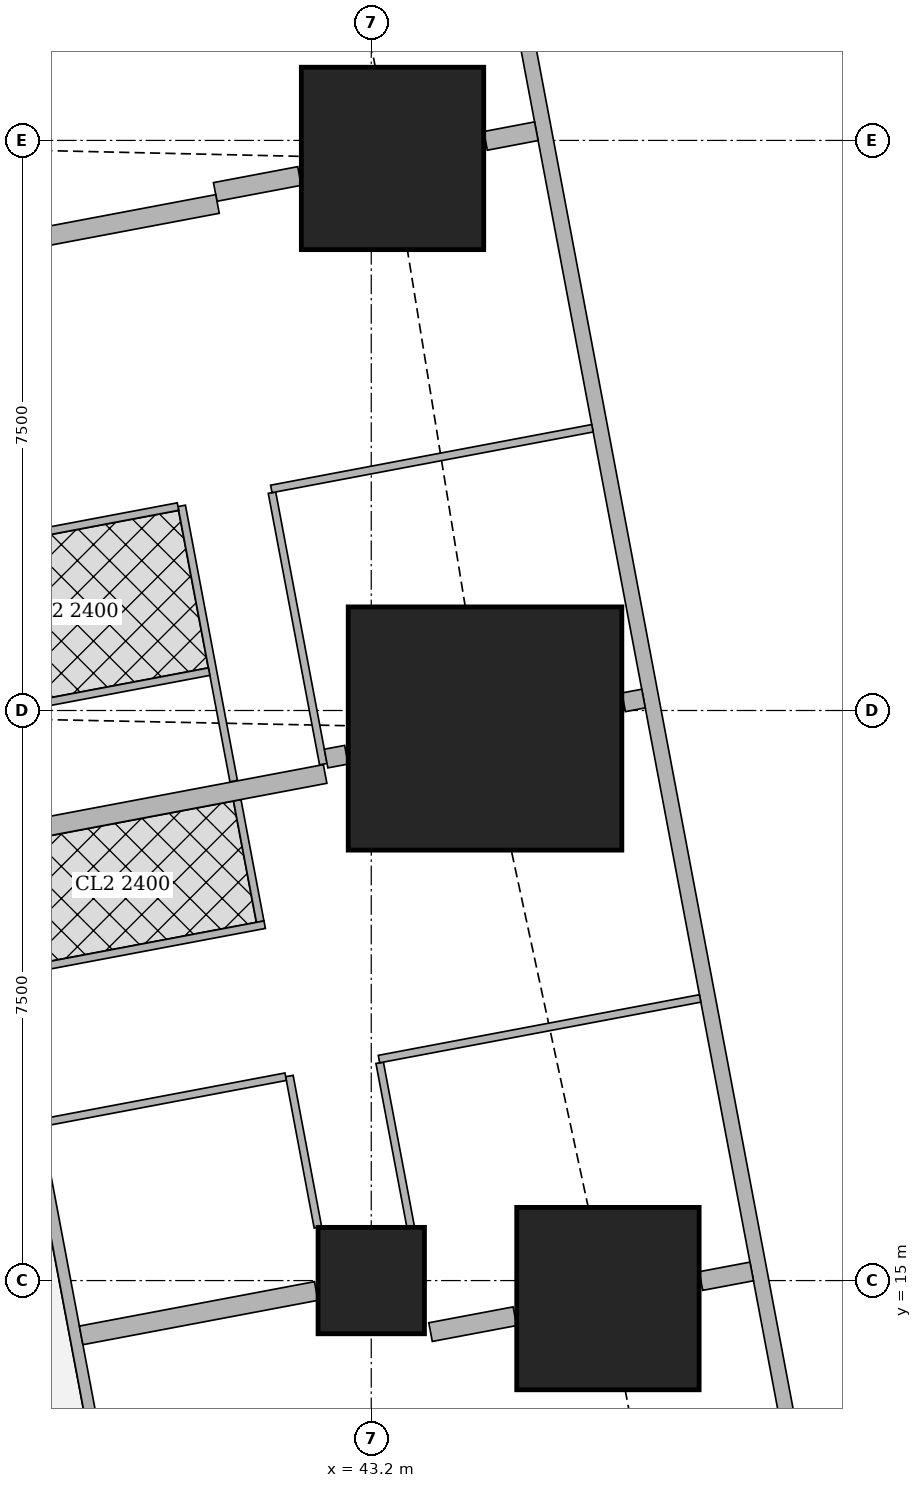
"""IFC4 building model, lengths in metres.
Left out: names, types, materials, properties, quantities, classifications, styles, units other than length and angle.
Written with IfcOpenShell. Run it as: python <this file> out.ifc"""

import sys

from ifc_helpers import new_model, si_unit, direction, frame, frame_2d, origin, origin_2d, place, context, subcontext, project, spatial, rectangle, extrude, element, fill, save


model = new_model("IFC4")
c1 = context("Model", 3, precision=1e-05, world=origin(), true_north=direction((0.0, 1.0)))
c2 = subcontext(c1, "Body", "Model", "MODEL_VIEW")
j1 = project(units=[si_unit("LENGTHUNIT", "METRE"), si_unit("PLANEANGLEUNIT", "RADIAN")], contexts=[c1])
p1 = place(None, origin())
s1 = spatial("IfcSite", under=j1, at=p1, CompositionType="ELEMENT")
p2 = place(p1, origin())
s2 = spatial("IfcBuilding", under=s1, at=p2, CompositionType="ELEMENT")
p3 = place(p2, frame((0.0, 0.0, 216.2)))
s3 = spatial("IfcBuildingStorey", under=s2, at=p3, CompositionType="ELEMENT", Elevation=216.2)
p4 = place(p3, frame((43.2, 15.0, 0.0), z_axis=(0.0, 0.0, 1.0), x_axis=(1.0, 0.0, 0.0)))
e1 = element("IfcColumn", 1, at=p4, inside=s3, PredefinedType="COLUMN", context=c2, shape_type="SweptSolid", body=[
    extrude(rectangle(XDim=1.4, YDim=1.4, at=origin_2d()), origin(), (0.0, 0.0, 1.0), 3.75),
])
p5 = place(p3, frame((46.314, 14.763, 0.0), z_axis=(0.0, 0.0, 1.0), x_axis=(1.0, 0.0, 0.0)))
e2 = element("IfcColumn", 2, at=p5, inside=s3, PredefinedType="COLUMN", context=c2, shape_type="SweptSolid", body=[
    extrude(rectangle(XDim=2.4, YDim=2.4, at=origin_2d()), origin(), (0.0, 0.0, 1.0), 3.75),
])
p6 = place(p3, frame((44.697, 22.263, 0.0), z_axis=(0.0, 0.0, 1.0), x_axis=(1.0, 0.0, 0.0)))
e3 = element("IfcColumn", 3, at=p6, inside=s3, PredefinedType="COLUMN", context=c2, shape_type="SweptSolid", body=[
    extrude(rectangle(XDim=3.6, YDim=3.2, at=origin_2d()), origin(), (0.0, 0.0, 1.0), 3.75),
])
p7 = place(p3, frame((43.48, 29.763, 0.0), z_axis=(0.0, 0.0, 1.0), x_axis=(1.0, 0.0, 0.0)))
e4 = element("IfcColumn", 4, at=p7, inside=s3, PredefinedType="COLUMN", context=c2, shape_type="SweptSolid", body=[
    extrude(rectangle(XDim=2.4, YDim=2.4, at=origin_2d()), origin(), (0.0, 0.0, 1.0), 3.75),
])
p8 = place(p3, frame((50.653, 2.703, 0.0), z_axis=(0.0, 0.0, 1.0), x_axis=(-0.185612026696, 0.982623109613, 0.0)))
e5 = element("IfcWall", 5, at=p8, inside=s3, PredefinedType="SOLIDWALL", context=c2, shape_type="SweptSolid", body=[
    extrude(rectangle(XDim=41.393, YDim=0.2, at=frame_2d((20.697, 0.0))), origin(), (0.0, 0.0, 1.0), 3.5),
])
p9 = place(p8, frame((1.633, 0.0, 0.9)))
e6 = element("IfcOpeningElement", 6, at=p9, cuts=e5, PredefinedType="OPENING", context=c2, shape_type="SweptSolid", body=[
    extrude(rectangle(XDim=1.8, YDim=1.5, at=frame_2d((0.9, 0.75))), frame((0.0, 0.11, 0.0), z_axis=(0.0, -1.0, 0.0), x_axis=(1.0, 0.0, 0.0)), (0.0, 0.0, 1.0), 0.22),
])
p10 = place(p8, frame((6.032, 0.0, 0.9)))
e7 = element("IfcOpeningElement", 7, at=p10, cuts=e5, PredefinedType="OPENING", context=c2, shape_type="SweptSolid", body=[
    extrude(rectangle(XDim=1.8, YDim=1.5, at=frame_2d((0.9, 0.75))), frame((0.0, 0.11, 0.0), z_axis=(0.0, -1.0, 0.0), x_axis=(1.0, 0.0, 0.0)), (0.0, 0.0, 1.0), 0.22),
])
p11 = place(p8, frame((9.848, 0.0, 0.9)))
e8 = element("IfcOpeningElement", 8, at=p11, cuts=e5, PredefinedType="OPENING", context=c2, shape_type="SweptSolid", body=[
    extrude(rectangle(XDim=1.8, YDim=1.5, at=frame_2d((0.9, 0.75))), frame((0.0, 0.11, 0.0), z_axis=(0.0, -1.0, 0.0), x_axis=(1.0, 0.0, 0.0)), (0.0, 0.0, 1.0), 0.22),
])
p12 = place(p8, frame((13.664, 0.0, 0.9)))
e9 = element("IfcOpeningElement", 9, at=p12, cuts=e5, PredefinedType="OPENING", context=c2, shape_type="SweptSolid", body=[
    extrude(rectangle(XDim=1.8, YDim=1.5, at=frame_2d((0.9, 0.75))), frame((0.0, 0.11, 0.0), z_axis=(0.0, -1.0, 0.0), x_axis=(1.0, 0.0, 0.0)), (0.0, 0.0, 1.0), 0.22),
])
p13 = place(p8, frame((17.481, 0.0, 0.9)))
e10 = element("IfcOpeningElement", 10, at=p13, cuts=e5, PredefinedType="OPENING", context=c2, shape_type="SweptSolid", body=[
    extrude(rectangle(XDim=1.8, YDim=1.5, at=frame_2d((0.9, 0.75))), frame((0.0, 0.11, 0.0), z_axis=(0.0, -1.0, 0.0), x_axis=(1.0, 0.0, 0.0)), (0.0, 0.0, 1.0), 0.22),
])
p14 = place(p8, frame((21.297, 0.0, 0.9)))
e11 = element("IfcOpeningElement", 11, at=p14, cuts=e5, PredefinedType="OPENING", context=c2, shape_type="SweptSolid", body=[
    extrude(rectangle(XDim=1.8, YDim=1.5, at=frame_2d((0.9, 0.75))), frame((0.0, 0.11, 0.0), z_axis=(0.0, -1.0, 0.0), x_axis=(1.0, 0.0, 0.0)), (0.0, 0.0, 1.0), 0.22),
])
p15 = place(p8, frame((25.113, 0.0, 0.9)))
e12 = element("IfcOpeningElement", 12, at=p15, cuts=e5, PredefinedType="OPENING", context=c2, shape_type="SweptSolid", body=[
    extrude(rectangle(XDim=1.8, YDim=1.5, at=frame_2d((0.9, 0.75))), frame((0.0, 0.11, 0.0), z_axis=(0.0, -1.0, 0.0), x_axis=(1.0, 0.0, 0.0)), (0.0, 0.0, 1.0), 0.22),
])
p16 = place(p8, frame((28.93, 0.0, 0.9)))
e13 = element("IfcOpeningElement", 13, at=p16, cuts=e5, PredefinedType="OPENING", context=c2, shape_type="SweptSolid", body=[
    extrude(rectangle(XDim=1.8, YDim=1.5, at=frame_2d((0.9, 0.75))), frame((0.0, 0.11, 0.0), z_axis=(0.0, -1.0, 0.0), x_axis=(1.0, 0.0, 0.0)), (0.0, 0.0, 1.0), 0.22),
])
p17 = place(p8, frame((32.746, 0.0, 0.9)))
e14 = element("IfcOpeningElement", 14, at=p17, cuts=e5, PredefinedType="OPENING", context=c2, shape_type="SweptSolid", body=[
    extrude(rectangle(XDim=1.8, YDim=1.5, at=frame_2d((0.9, 0.75))), frame((0.0, 0.11, 0.0), z_axis=(0.0, -1.0, 0.0), x_axis=(1.0, 0.0, 0.0)), (0.0, 0.0, 1.0), 0.22),
])
p18 = place(p8, frame((36.481, 0.0, 0.9)))
e15 = element("IfcOpeningElement", 15, at=p18, cuts=e5, PredefinedType="OPENING", context=c2, shape_type="SweptSolid", body=[
    extrude(rectangle(XDim=1.8, YDim=1.5, at=frame_2d((0.9, 0.75))), frame((0.0, 0.11, 0.0), z_axis=(0.0, -1.0, 0.0), x_axis=(1.0, 0.0, 0.0)), (0.0, 0.0, 1.0), 0.22),
])
p19 = place(p3, frame((33.933, 42.73, 0.0), z_axis=(0.0, 0.0, 1.0), x_axis=(0.185595417643, -0.982626246825, 0.0)))
e16 = element("IfcWall", 16, at=p19, inside=s3, PredefinedType="SOLIDWALL", context=c2, shape_type="SweptSolid", body=[
    extrude(rectangle(XDim=41.051, YDim=0.15, at=frame_2d((20.525, 0.0))), origin(), (0.0, 0.0, 1.0), 2.5),
])
p20 = place(p19, frame((12.266, 0.0, 0.0)))
e17 = element("IfcOpeningElement", 17, at=p20, cuts=e16, PredefinedType="OPENING", context=c2, shape_type="SweptSolid", body=[
    extrude(rectangle(XDim=1.0, YDim=2.1, at=frame_2d((0.5, 1.05))), frame((0.0, 0.085, 0.0), z_axis=(0.0, -1.0, 0.0), x_axis=(1.0, 0.0, 0.0)), (0.0, 0.0, 1.0), 0.17),
])
p21 = place(p19, frame((16.082, 0.0, 0.0)))
e18 = element("IfcOpeningElement", 18, at=p21, cuts=e16, PredefinedType="OPENING", context=c2, shape_type="SweptSolid", body=[
    extrude(rectangle(XDim=1.0, YDim=2.1, at=frame_2d((0.5, 1.05))), frame((0.0, 0.085, 0.0), z_axis=(0.0, -1.0, 0.0), x_axis=(1.0, 0.0, 0.0)), (0.0, 0.0, 1.0), 0.17),
])
p22 = place(p19, frame((24.369, 0.0, 0.0)))
e19 = element("IfcOpeningElement", 19, at=p22, cuts=e16, PredefinedType="OPENING", context=c2, shape_type="SweptSolid", body=[
    extrude(rectangle(XDim=1.0, YDim=2.1, at=frame_2d((0.5, 1.05))), frame((0.0, 0.085, 0.0), z_axis=(0.0, -1.0, 0.0), x_axis=(1.0, 0.0, 0.0)), (0.0, 0.0, 1.0), 0.17),
])
p23 = place(p19, frame((30.862, 0.0, 0.0)))
e20 = element("IfcOpeningElement", 20, at=p23, cuts=e16, PredefinedType="OPENING", context=c2, shape_type="SweptSolid", body=[
    extrude(rectangle(XDim=1.0, YDim=2.1, at=frame_2d((0.5, 1.05))), frame((0.0, 0.085, 0.0), z_axis=(0.0, -1.0, 0.0), x_axis=(1.0, 0.0, 0.0)), (0.0, 0.0, 1.0), 0.17),
])
p24 = place(p3, frame((41.894, 25.366, 0.0), z_axis=(0.0, 0.0, 1.0), x_axis=(0.185695396387, -0.98260735788, 0.0)))
e21 = element("IfcWall", 21, at=p24, inside=s3, PredefinedType="PARTITIONING", context=c2, shape_type="SweptSolid", body=[
    extrude(rectangle(XDim=3.635, YDim=0.1, at=frame_2d((1.818, 0.0))), origin(), (0.0, 0.0, 1.0), 2.5),
])
p25 = place(p24, frame((0.151, 0.0, 0.0)))
e22 = element("IfcOpeningElement", 22, at=p25, cuts=e21, PredefinedType="OPENING", context=c2, shape_type="SweptSolid", body=[
    extrude(rectangle(XDim=0.9, YDim=2.1, at=frame_2d((0.45, 1.05))), frame((0.0, 0.06, 0.0), z_axis=(0.0, -1.0, 0.0), x_axis=(1.0, 0.0, 0.0)), (0.0, 0.0, 1.0), 0.12),
])
p26 = place(p3, frame((40.706, 25.192, 0.0), z_axis=(0.0, 0.0, 1.0), x_axis=(0.185580474845, -0.982629069057, 0.0)))
e23 = element("IfcWall", 23, at=p26, inside=s3, PredefinedType="PARTITIONING", context=c2, shape_type="SweptSolid", body=[
    extrude(rectangle(XDim=3.685, YDim=0.1, at=frame_2d((1.842, 0.0))), origin(), (0.0, 0.0, 1.0), 2.5),
])
p27 = place(p26, frame((0.655, 0.0, 0.0)))
e24 = element("IfcOpeningElement", 24, at=p27, cuts=e23, PredefinedType="OPENING", context=c2, shape_type="SweptSolid", body=[
    extrude(rectangle(XDim=0.9, YDim=2.1, at=frame_2d((0.45, 1.05))), frame((0.0, 0.06, 0.0), z_axis=(0.0, -1.0, 0.0), x_axis=(1.0, 0.0, 0.0)), (0.0, 0.0, 1.0), 0.12),
])
p28 = place(p26, frame((2.563, 0.0, 0.0)))
e25 = element("IfcOpeningElement", 25, at=p28, cuts=e23, PredefinedType="OPENING", context=c2, shape_type="SweptSolid", body=[
    extrude(rectangle(XDim=0.9, YDim=2.1, at=frame_2d((0.45, 1.05))), frame((0.0, 0.06, 0.0), z_axis=(0.0, -1.0, 0.0), x_axis=(1.0, 0.0, 0.0)), (0.0, 0.0, 1.0), 0.12),
])
p29 = place(p3, frame((46.11, 26.213, 0.0), z_axis=(0.0, 0.0, 1.0), x_axis=(-0.982633535512, -0.185556823879, 0.0)))
e26 = element("IfcWall", 26, at=p29, inside=s3, PredefinedType="PARTITIONING", context=c2, shape_type="SweptSolid", body=[
    extrude(rectangle(XDim=4.3, YDim=0.1, at=frame_2d((2.15, 0.0))), origin(), (0.0, 0.0, 1.0), 2.05),
])
p30 = place(p3, frame((40.657, 25.183, 0.0), z_axis=(0.0, 0.0, 1.0), x_axis=(-0.982607026909, -0.185697147715, 0.0)))
e27 = element("IfcWall", 27, at=p30, inside=s3, PredefinedType="PARTITIONING", context=c2, shape_type="SweptSolid", body=[
    extrude(rectangle(XDim=3.275, YDim=0.1, at=frame_2d((1.637, 0.0))), origin(), (0.0, 0.0, 1.0), 3.5),
])
p31 = place(p3, frame((41.067, 23.011, 0.0), z_axis=(0.0, 0.0, 1.0), x_axis=(-0.982618057925, -0.185638768151, 0.0)))
e28 = element("IfcWall", 28, at=p31, inside=s3, PredefinedType="PARTITIONING", context=c2, shape_type="SweptSolid", body=[
    extrude(rectangle(XDim=3.275, YDim=0.1, at=frame_2d((1.637, 0.0))), origin(), (0.0, 0.0, 1.0), 2.5),
])
p32 = place(p3, frame((45.372, 30.121, 0.0), z_axis=(0.0, 0.0, 1.0), x_axis=(-0.982347993061, -0.187062611252, 0.0)))
e29 = element("IfcWall", 29, at=p32, inside=s3, PredefinedType="SOLIDWALL", context=c2, shape_type="SweptSolid", body=[
    extrude(rectangle(XDim=0.68, YDim=0.25, at=frame_2d((0.34, 0.0))), origin(), (0.0, 0.0, 1.0), 2.05),
])
p33 = place(p3, frame((42.256, 29.532, 0.0), z_axis=(0.0, 0.0, 1.0), x_axis=(-0.982549954272, -0.185998890749, 0.0)))
e30 = element("IfcWall", 30, at=p33, inside=s3, PredefinedType="SOLIDWALL", context=c2, shape_type="SweptSolid", body=[
    extrude(rectangle(XDim=1.129, YDim=0.25, at=frame_2d((0.564, 0.0))), origin(), (0.0, 0.0, 1.0), 2.05),
])
p34 = place(p3, frame((41.177, 29.164, 0.0), z_axis=(0.0, 0.0, 1.0), x_axis=(-0.982612837616, -0.185666398014, 0.0)))
e31 = element("IfcWall", 31, at=p34, inside=s3, PredefinedType="SOLIDWALL", context=c2, shape_type="SweptSolid", body=[
    extrude(rectangle(XDim=4.525, YDim=0.25, at=frame_2d((2.262, 0.0))), origin(), (0.0, 0.0, 1.0), 2.5),
])
p35 = place(p3, frame((41.437, 21.319, 0.0), z_axis=(0.0, 0.0, 1.0), x_axis=(0.185793689589, -0.982588777113, 0.0)))
e32 = element("IfcWall", 32, at=p35, inside=s3, PredefinedType="PARTITIONING", context=c2, shape_type="SweptSolid", body=[
    extrude(rectangle(XDim=1.625, YDim=0.1, at=frame_2d((0.813, 0.0))), origin(), (0.0, 0.0, 1.0), 3.5),
])
p36 = place(p35, frame((0.325, 0.0, 0.0)))
e33 = element("IfcOpeningElement", 33, at=p36, cuts=e32, PredefinedType="OPENING", context=c2, shape_type="SweptSolid", body=[
    extrude(rectangle(XDim=0.9, YDim=2.1, at=frame_2d((0.45, 1.05))), frame((0.0, 0.06, 0.0), z_axis=(0.0, -1.0, 0.0), x_axis=(1.0, 0.0, 0.0)), (0.0, 0.0, 1.0), 0.12),
])
p37 = place(p3, frame((41.798, 19.682, 0.0), z_axis=(0.0, 0.0, 1.0), x_axis=(-0.982656183703, -0.185436848091, 0.0)))
e34 = element("IfcWall", 34, at=p37, inside=s3, PredefinedType="PARTITIONING", context=c2, shape_type="SweptSolid", body=[
    extrude(rectangle(XDim=3.376, YDim=0.1, at=frame_2d((1.688, 0.0))), origin(), (0.0, 0.0, 1.0), 3.5),
])
p38 = place(p3, frame((43.311, 17.865, 0.0), z_axis=(0.0, 0.0, 1.0), x_axis=(0.185572140257, -0.982630643101, 0.0)))
e35 = element("IfcWall", 35, at=p38, inside=s3, PredefinedType="PARTITIONING", context=c2, shape_type="SweptSolid", body=[
    extrude(rectangle(XDim=2.193, YDim=0.1, at=frame_2d((1.097, 0.0))), origin(), (0.0, 0.0, 1.0), 3.5),
])
p39 = place(p38, frame((0.15, 0.0, 0.0)))
e36 = element("IfcOpeningElement", 36, at=p39, cuts=e35, PredefinedType="OPENING", context=c2, shape_type="SweptSolid", body=[
    extrude(rectangle(XDim=0.9, YDim=2.1, at=frame_2d((0.45, 1.05))), frame((0.0, 0.06, 0.0), z_axis=(0.0, -1.0, 0.0), x_axis=(1.0, 0.0, 0.0)), (0.0, 0.0, 1.0), 0.12),
])
p40 = place(p3, frame((42.123, 17.691, 0.0), z_axis=(0.0, 0.0, 1.0), x_axis=(0.185183804812, -0.98270390171, 0.0)))
e37 = element("IfcWall", 37, at=p40, inside=s3, PredefinedType="PARTITIONING", context=c2, shape_type="SweptSolid", body=[
    extrude(rectangle(XDim=2.025, YDim=0.1, at=frame_2d((1.012, 0.0))), origin(), (0.0, 0.0, 1.0), 3.5),
])
p41 = place(p3, frame((47.527, 18.712, 0.0), z_axis=(0.0, 0.0, 1.0), x_axis=(-0.982633535512, -0.185556823879, 0.0)))
e38 = element("IfcWall", 38, at=p41, inside=s3, PredefinedType="PARTITIONING", context=c2, shape_type="SweptSolid", body=[
    extrude(rectangle(XDim=4.3, YDim=0.1, at=frame_2d((2.15, 0.0))), origin(), (0.0, 0.0, 1.0), 2.05),
])
p42 = place(p3, frame((42.074, 17.682, 0.0), z_axis=(0.0, 0.0, 1.0), x_axis=(-0.982630897129, -0.185570795135, 0.0)))
e39 = element("IfcWall", 39, at=p42, inside=s3, PredefinedType="PARTITIONING", context=c2, shape_type="SweptSolid", body=[
    extrude(rectangle(XDim=3.276, YDim=0.1, at=frame_2d((1.638, 0.0))), origin(), (0.0, 0.0, 1.0), 3.5),
])
p43 = place(p42, frame((1.201, 0.0, 0.0)))
e40 = element("IfcOpeningElement", 40, at=p43, cuts=e39, PredefinedType="OPENING", context=c2, shape_type="SweptSolid", body=[
    extrude(rectangle(XDim=0.9, YDim=2.1, at=frame_2d((0.45, 1.05))), frame((0.0, 0.06, 0.0), z_axis=(0.0, -1.0, 0.0), x_axis=(1.0, 0.0, 0.0)), (0.0, 0.0, 1.0), 0.12),
])
p44 = place(p3, frame((46.782, 22.657, 0.0), z_axis=(0.0, 0.0, 1.0), x_axis=(-0.982778390997, -0.18478807913, 0.0)))
e41 = element("IfcWall", 41, at=p44, inside=s3, PredefinedType="SOLIDWALL", context=c2, shape_type="SweptSolid", body=[
    extrude(rectangle(XDim=0.266, YDim=0.25, at=frame_2d((0.133, 0.0))), origin(), (0.0, 0.0, 1.0), 3.5),
])
p45 = place(p3, frame((42.873, 21.918, 0.0), z_axis=(0.0, 0.0, 1.0), x_axis=(-0.982892522967, -0.184180043152, 0.0)))
e42 = element("IfcWall", 42, at=p45, inside=s3, PredefinedType="SOLIDWALL", context=c2, shape_type="SweptSolid", body=[
    extrude(rectangle(XDim=0.272, YDim=0.25, at=frame_2d((0.136, 0.0))), origin(), (0.0, 0.0, 1.0), 2.5),
])
p46 = place(p3, frame((42.593, 21.665, 0.0), z_axis=(0.0, 0.0, 1.0), x_axis=(-0.982612837616, -0.185666398014, 0.0)))
e43 = element("IfcWall", 43, at=p46, inside=s3, PredefinedType="SOLIDWALL", context=c2, shape_type="SweptSolid", body=[
    extrude(rectangle(XDim=4.525, YDim=0.25, at=frame_2d((2.262, 0.0))), origin(), (0.0, 0.0, 1.0), 2.5),
])
p47 = place(p3, frame((48.206, 15.12, 0.0), z_axis=(0.0, 0.0, 1.0), x_axis=(-0.982610999048, -0.18567612811, 0.0)))
e44 = element("IfcWall", 44, at=p47, inside=s3, PredefinedType="SOLIDWALL", context=c2, shape_type="SweptSolid", body=[
    extrude(rectangle(XDim=0.68, YDim=0.25, at=frame_2d((0.34, 0.0))), origin(), (0.0, 0.0, 1.0), 2.05),
])
p48 = place(p3, frame((45.09, 14.531, 0.0), z_axis=(0.0, 0.0, 1.0), x_axis=(-0.982737354171, -0.185006196431, 0.0)))
e45 = element("IfcWall", 45, at=p48, inside=s3, PredefinedType="SOLIDWALL", context=c2, shape_type="SweptSolid", body=[
    extrude(rectangle(XDim=1.13, YDim=0.25, at=frame_2d((0.565, 0.0))), origin(), (0.0, 0.0, 1.0), 2.05),
])
p49 = place(p3, frame((42.476, 14.863, 0.0), z_axis=(0.0, 0.0, 1.0), x_axis=(-0.982638716117, -0.185529387398, 0.0)))
e46 = element("IfcWall", 46, at=p49, inside=s3, PredefinedType="SOLIDWALL", context=c2, shape_type="SweptSolid", body=[
    extrude(rectangle(XDim=3.148, YDim=0.25, at=frame_2d((1.574, 0.0))), origin(), (0.0, 0.0, 1.0), 3.5),
])
p50 = place(p11, origin())
e47 = element("IfcWindow", 47, at=p50, inside=s3, PartitioningType="SINGLE_PANEL", PredefinedType="WINDOW", context=c2, shape_type="SweptSolid", body=[
    extrude(rectangle(XDim=1.8, YDim=1.5, at=frame_2d((0.9, 0.75))), frame((0.0, 0.03, 0.0), z_axis=(0.0, -1.0, 0.0), x_axis=(1.0, 0.0, 0.0)), (0.0, 0.0, 1.0), 0.06),
])
fill(e8, e47)
p51 = place(p12, origin())
e48 = element("IfcWindow", 48, at=p51, inside=s3, PartitioningType="SINGLE_PANEL", PredefinedType="WINDOW", context=c2, shape_type="SweptSolid", body=[
    extrude(rectangle(XDim=1.8, YDim=1.5, at=frame_2d((0.9, 0.75))), frame((0.0, 0.03, 0.0), z_axis=(0.0, -1.0, 0.0), x_axis=(1.0, 0.0, 0.0)), (0.0, 0.0, 1.0), 0.06),
])
fill(e9, e48)
p52 = place(p13, origin())
e49 = element("IfcWindow", 49, at=p52, inside=s3, PartitioningType="SINGLE_PANEL", PredefinedType="WINDOW", context=c2, shape_type="SweptSolid", body=[
    extrude(rectangle(XDim=1.8, YDim=1.5, at=frame_2d((0.9, 0.75))), frame((0.0, 0.03, 0.0), z_axis=(0.0, -1.0, 0.0), x_axis=(1.0, 0.0, 0.0)), (0.0, 0.0, 1.0), 0.06),
])
fill(e10, e49)
p53 = place(p14, origin())
e50 = element("IfcWindow", 50, at=p53, inside=s3, PartitioningType="SINGLE_PANEL", PredefinedType="WINDOW", context=c2, shape_type="SweptSolid", body=[
    extrude(rectangle(XDim=1.8, YDim=1.5, at=frame_2d((0.9, 0.75))), frame((0.0, 0.03, 0.0), z_axis=(0.0, -1.0, 0.0), x_axis=(1.0, 0.0, 0.0)), (0.0, 0.0, 1.0), 0.06),
])
fill(e11, e50)
p54 = place(p15, origin())
e51 = element("IfcWindow", 51, at=p54, inside=s3, PartitioningType="SINGLE_PANEL", PredefinedType="WINDOW", context=c2, shape_type="SweptSolid", body=[
    extrude(rectangle(XDim=1.8, YDim=1.5, at=frame_2d((0.9, 0.75))), frame((0.0, 0.03, 0.0), z_axis=(0.0, -1.0, 0.0), x_axis=(1.0, 0.0, 0.0)), (0.0, 0.0, 1.0), 0.06),
])
fill(e12, e51)
p55 = place(p16, origin())
e52 = element("IfcWindow", 52, at=p55, inside=s3, PartitioningType="SINGLE_PANEL", PredefinedType="WINDOW", context=c2, shape_type="SweptSolid", body=[
    extrude(rectangle(XDim=1.8, YDim=1.5, at=frame_2d((0.9, 0.75))), frame((0.0, 0.03, 0.0), z_axis=(0.0, -1.0, 0.0), x_axis=(1.0, 0.0, 0.0)), (0.0, 0.0, 1.0), 0.06),
])
fill(e13, e52)
p56 = place(p25, origin())
e53 = element("IfcDoor", 53, at=p56, inside=s3, OperationType="SINGLE_SWING_LEFT", PredefinedType="DOOR", context=c2, shape_type="SweptSolid", body=[
    extrude(rectangle(XDim=0.9, YDim=2.1, at=frame_2d((0.45, 1.05))), frame((0.0, 0.025, 0.0), z_axis=(0.0, -1.0, 0.0), x_axis=(1.0, 0.0, 0.0)), (0.0, 0.0, 1.0), 0.05),
])
fill(e22, e53)
p57 = place(p27, origin())
e54 = element("IfcDoor", 54, at=p57, inside=s3, OperationType="SINGLE_SWING_RIGHT", PredefinedType="DOOR", context=c2, shape_type="SweptSolid", body=[
    extrude(rectangle(XDim=0.9, YDim=2.1, at=frame_2d((0.45, 1.05))), frame((0.0, 0.025, 0.0), z_axis=(0.0, -1.0, 0.0), x_axis=(1.0, 0.0, 0.0)), (0.0, 0.0, 1.0), 0.05),
])
fill(e24, e54)
p58 = place(p28, origin())
e55 = element("IfcDoor", 55, at=p58, inside=s3, OperationType="SINGLE_SWING_LEFT", PredefinedType="DOOR", context=c2, shape_type="SweptSolid", body=[
    extrude(rectangle(XDim=0.9, YDim=2.1, at=frame_2d((0.45, 1.05))), frame((0.0, 0.025, 0.0), z_axis=(0.0, -1.0, 0.0), x_axis=(1.0, 0.0, 0.0)), (0.0, 0.0, 1.0), 0.05),
])
fill(e25, e55)
p59 = place(p36, origin())
e56 = element("IfcDoor", 56, at=p59, inside=s3, OperationType="SINGLE_SWING_RIGHT", PredefinedType="DOOR", context=c2, shape_type="SweptSolid", body=[
    extrude(rectangle(XDim=0.9, YDim=2.1, at=frame_2d((0.45, 1.05))), frame((0.0, 0.025, 0.0), z_axis=(0.0, -1.0, 0.0), x_axis=(1.0, 0.0, 0.0)), (0.0, 0.0, 1.0), 0.05),
])
fill(e33, e56)
p60 = place(p39, origin())
e57 = element("IfcDoor", 57, at=p60, inside=s3, OperationType="SINGLE_SWING_LEFT", PredefinedType="DOOR", context=c2, shape_type="SweptSolid", body=[
    extrude(rectangle(XDim=0.9, YDim=2.1, at=frame_2d((0.45, 1.05))), frame((0.0, 0.025, 0.0), z_axis=(0.0, -1.0, 0.0), x_axis=(1.0, 0.0, 0.0)), (0.0, 0.0, 1.0), 0.05),
])
fill(e36, e57)
p61 = place(p43, origin())
e58 = element("IfcDoor", 58, at=p61, inside=s3, OperationType="SINGLE_SWING_RIGHT", PredefinedType="DOOR", context=c2, shape_type="SweptSolid", body=[
    extrude(rectangle(XDim=0.9, YDim=2.1, at=frame_2d((0.45, 1.05))), frame((0.0, 0.025, 0.0), z_axis=(0.0, -1.0, 0.0), x_axis=(1.0, 0.0, 0.0)), (0.0, 0.0, 1.0), 0.05),
])
fill(e40, e58)
save(model, sys.argv[1])
